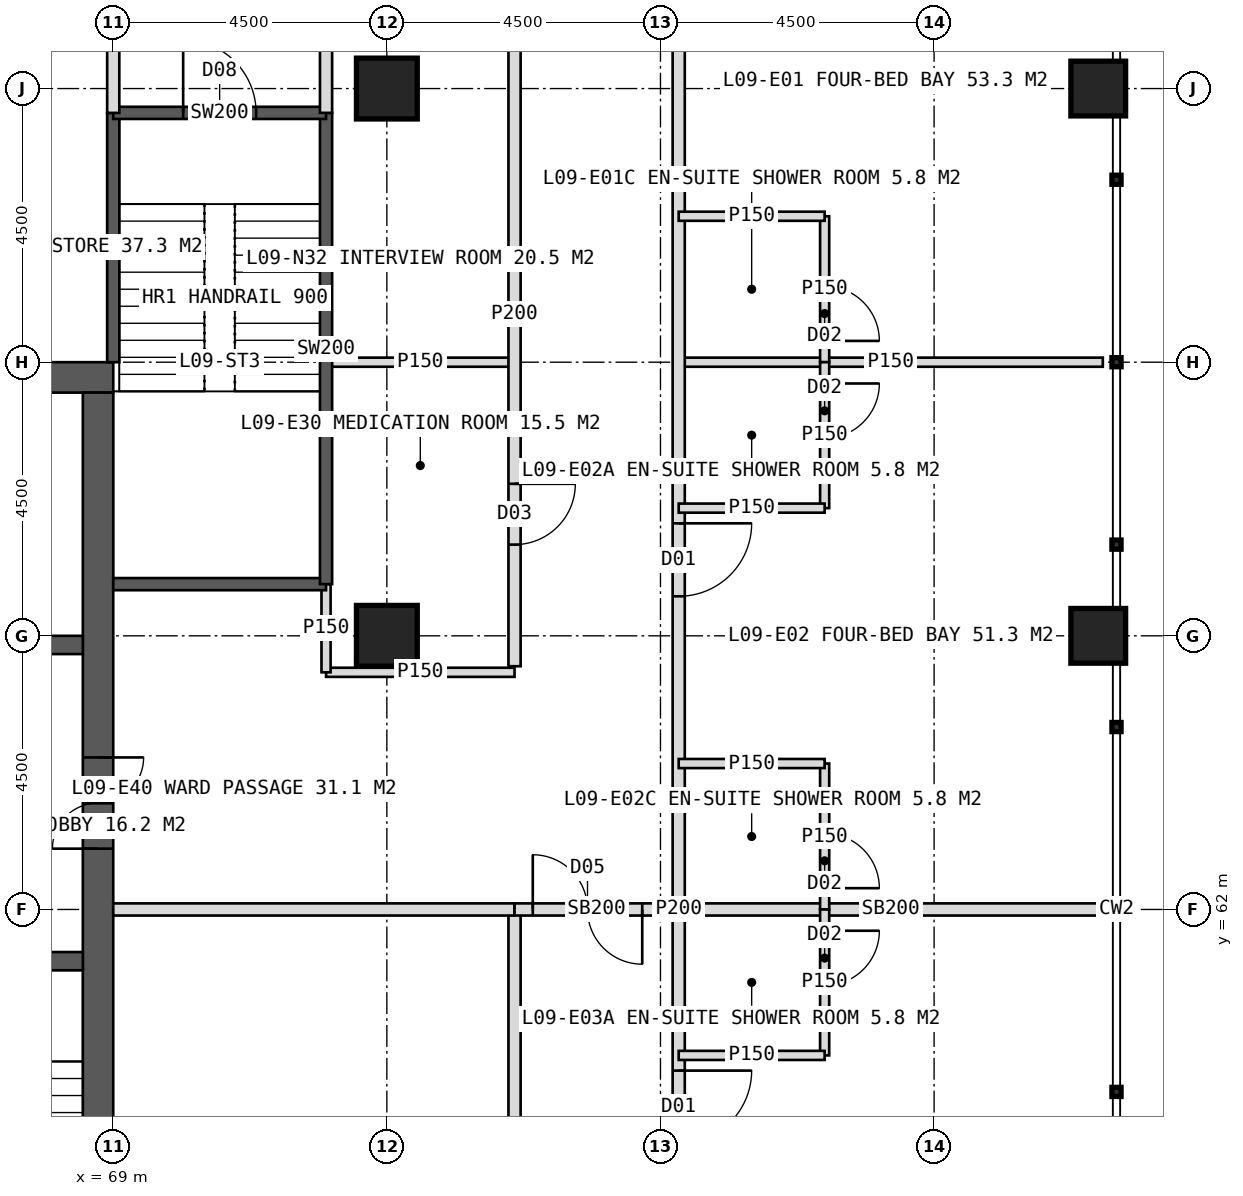
"""IFC4 building model, lengths in metres.
Left out: names, types, materials, properties, quantities, classifications, styles, units other than length and angle.
Written with IfcOpenShell. Run it as: python <this file> out.ifc"""

import sys

from ifc_helpers import new_model, si_unit, direction, frame, frame_2d, origin, origin_2d, place, context, subcontext, project, spatial, rectangle, hollow_rectangle, extrude, element, fill, save


model = new_model("IFC4")
c1 = context("Model", 3, precision=1e-05, world=origin(), true_north=direction((0.0, 1.0)))
c2 = subcontext(c1, "Body", "Model", "MODEL_VIEW")
j1 = project(units=[si_unit("LENGTHUNIT", "METRE"), si_unit("PLANEANGLEUNIT", "RADIAN")], contexts=[c1])
p1 = place(None, origin())
s1 = spatial("IfcSite", under=j1, at=p1, CompositionType="ELEMENT")
p2 = place(p1, origin())
s2 = spatial("IfcBuilding", under=s1, at=p2, CompositionType="ELEMENT")
p3 = place(p2, frame((0.0, 0.0, 43.0)))
s3 = spatial("IfcBuildingStorey", under=s2, at=p3, CompositionType="ELEMENT", Elevation=43.0)
p4 = place(p3, frame((51.0, 70.75, 0.0), z_axis=(0.0, 0.0, 1.0), x_axis=(1.0, 0.0, 0.0)))
e1 = element("IfcWall", 1, at=p4, inside=s3, PredefinedType="SHEAR", context=c2, shape_type="SweptSolid", body=[
    extrude(rectangle(XDim=18.0, YDim=0.5, at=frame_2d((9.0, 0.0))), origin(), (0.0, 0.0, 1.0), 4.0),
])
p5 = place(p4, frame((8.1, 0.0, 0.0)))
e2 = element("IfcOpeningElement", 2, at=p5, cuts=e1, PredefinedType="OPENING", context=c2, shape_type="SweptSolid", body=[
    extrude(rectangle(XDim=1.8, YDim=2.2, at=frame_2d((0.9, 1.1))), frame((0.0, 0.26, 0.0), z_axis=(0.0, -1.0, 0.0), x_axis=(1.0, 0.0, 0.0)), (0.0, 0.0, 1.0), 0.52),
])
p6 = place(p3, frame((68.75, 53.5, 0.0), z_axis=(0.0, 0.0, 1.0), x_axis=(0.0, 1.0, 0.0)))
e3 = element("IfcWall", 3, at=p6, inside=s3, PredefinedType="SHEAR", context=c2, shape_type="SweptSolid", body=[
    extrude(rectangle(XDim=17.0, YDim=0.5, at=frame_2d((8.5, 0.0))), origin(), (0.0, 0.0, 1.0), 4.0),
])
p7 = place(p6, frame((9.5, 0.0, 0.0)))
e4 = element("IfcOpeningElement", 4, at=p7, cuts=e3, PredefinedType="OPENING", context=c2, shape_type="SweptSolid", body=[
    extrude(rectangle(XDim=1.5, YDim=2.2, at=frame_2d((0.75, 1.1))), frame((0.0, 0.26, 0.0), z_axis=(0.0, -1.0, 0.0), x_axis=(1.0, 0.0, 0.0)), (0.0, 0.0, 1.0), 0.52),
])
p8 = place(p3, frame((65.2, 61.15, 0.0), z_axis=(0.0, 0.0, 1.0), x_axis=(1.0, 0.0, 0.0)))
e5 = element("IfcWall", 5, at=p8, inside=s3, PredefinedType="SHEAR", context=c2, shape_type="SweptSolid", body=[
    extrude(rectangle(XDim=3.3, YDim=0.3, at=frame_2d((1.65, 0.0))), origin(), (0.0, 0.0, 1.0), 4.0),
])
p9 = place(p8, frame((1.05, 0.0, 0.0)))
e6 = element("IfcOpeningElement", 6, at=p9, cuts=e5, PredefinedType="OPENING", context=c2, shape_type="SweptSolid", body=[
    extrude(rectangle(XDim=1.2, YDim=2.1, at=frame_2d((0.6, 1.05))), frame((0.0, 0.16, 0.0), z_axis=(0.0, -1.0, 0.0), x_axis=(1.0, 0.0, 0.0)), (0.0, 0.0, 1.0), 0.32),
])
p10 = place(p3, frame((65.2, 66.35, 0.0), z_axis=(0.0, 0.0, 1.0), x_axis=(1.0, 0.0, 0.0)))
e7 = element("IfcWall", 7, at=p10, inside=s3, PredefinedType="SHEAR", context=c2, shape_type="SweptSolid", body=[
    extrude(rectangle(XDim=3.3, YDim=0.3, at=frame_2d((1.65, 0.0))), origin(), (0.0, 0.0, 1.0), 4.0),
])
p11 = place(p10, frame((1.05, 0.0, 0.0)))
e8 = element("IfcOpeningElement", 8, at=p11, cuts=e7, PredefinedType="OPENING", context=c2, shape_type="SweptSolid", body=[
    extrude(rectangle(XDim=1.2, YDim=2.2, at=frame_2d((0.6, 1.1))), frame((0.0, 0.16, 0.0), z_axis=(0.0, -1.0, 0.0), x_axis=(1.0, 0.0, 0.0)), (0.0, 0.0, 1.0), 0.32),
])
for number, where, z_axis, x_axis in (
    (9, (73.5, 75.5, 0.0), (0.0, 0.0, 1.0), (1.0, 0.0, 0.0)),
    (10, (73.5, 66.5, 0.0), (0.0, 0.0, 1.0), (1.0, 0.0, 0.0)),
):
    element("IfcColumn", number, at=place(p3, frame(where, z_axis=z_axis, x_axis=x_axis)), inside=s3, PredefinedType="COLUMN", context=c2, shape_type="SweptSolid", body=[
        extrude(hollow_rectangle(XDim=1.0, YDim=1.0, WallThickness=0.1, at=origin_2d()), origin(), (0.0, 0.0, 1.0), 4.0),
    ])
for number, where, z_axis, x_axis in (
    (11, (85.2, 66.5, 0.0), (0.0, 0.0, 1.0), (1.0, 0.0, 0.0)),
    (12, (85.2, 75.5, 0.0), (0.0, 0.0, 1.0), (1.0, 0.0, 0.0)),
):
    element("IfcColumn", number, at=place(p3, frame(where, z_axis=z_axis, x_axis=x_axis)), inside=s3, PredefinedType="COLUMN", context=c2, shape_type="SweptSolid", body=[
        extrude(hollow_rectangle(XDim=0.9, YDim=0.9, WallThickness=0.08, at=origin_2d()), origin(), (0.0, 0.0, 1.0), 4.0),
    ])
p12 = place(p3, frame((78.3, 71.0, 0.0), z_axis=(0.0, 0.0, 1.0), x_axis=(1.0, 0.0, 0.0)))
e13 = element("IfcWall", 13, at=p12, inside=s3, PredefinedType="PARTITIONING", context=c2, shape_type="SweptSolid", body=[
    extrude(rectangle(XDim=6.975, YDim=0.15, at=frame_2d((3.487, 0.0))), origin(), (0.0, 0.0, 1.0), 3.75),
])
p13 = place(p3, frame((78.3, 62.0, 0.0), z_axis=(0.0, 0.0, 1.0), x_axis=(1.0, 0.0, 0.0)))
e14 = element("IfcWall", 14, at=p13, inside=s3, PredefinedType="SOLIDWALL", context=c2, shape_type="SweptSolid", body=[
    extrude(rectangle(XDim=6.975, YDim=0.2, at=frame_2d((3.487, 0.0))), origin(), (0.0, 0.0, 1.0), 2.75),
])
p14 = place(p3, frame((78.3, 80.3, 0.0), z_axis=(0.0, 0.0, 1.0), x_axis=(0.0, -1.0, 0.0)))
e15 = element("IfcWall", 15, at=p14, inside=s3, PredefinedType="PARTITIONING", context=c2, shape_type="SweptSolid", body=[
    extrude(rectangle(XDim=36.6, YDim=0.2, at=frame_2d((18.3, 0.0))), origin(), (0.0, 0.0, 1.0), 3.75),
])
p15 = place(p14, frame((2.65, 0.0, 0.0)))
e16 = element("IfcOpeningElement", 16, at=p15, cuts=e15, PredefinedType="OPENING", context=c2, shape_type="SweptSolid", body=[
    extrude(rectangle(XDim=1.2, YDim=2.2, at=frame_2d((0.6, 1.1))), frame((0.0, 0.11, 0.0), z_axis=(0.0, -1.0, 0.0), x_axis=(1.0, 0.0, 0.0)), (0.0, 0.0, 1.0), 0.22),
])
p16 = place(p14, frame((11.95, 0.0, 0.0)))
e17 = element("IfcOpeningElement", 17, at=p16, cuts=e15, PredefinedType="OPENING", context=c2, shape_type="SweptSolid", body=[
    extrude(rectangle(XDim=1.2, YDim=2.2, at=frame_2d((0.6, 1.1))), frame((0.0, 0.11, 0.0), z_axis=(0.0, -1.0, 0.0), x_axis=(1.0, 0.0, 0.0)), (0.0, 0.0, 1.0), 0.22),
])
p17 = place(p14, frame((20.95, 0.0, 0.0)))
e18 = element("IfcOpeningElement", 18, at=p17, cuts=e15, PredefinedType="OPENING", context=c2, shape_type="SweptSolid", body=[
    extrude(rectangle(XDim=1.2, YDim=2.2, at=frame_2d((0.6, 1.1))), frame((0.0, 0.11, 0.0), z_axis=(0.0, -1.0, 0.0), x_axis=(1.0, 0.0, 0.0)), (0.0, 0.0, 1.0), 0.22),
])
p18 = place(p14, frame((29.95, 0.0, 0.0)))
e19 = element("IfcOpeningElement", 19, at=p18, cuts=e15, PredefinedType="OPENING", context=c2, shape_type="SweptSolid", body=[
    extrude(rectangle(XDim=1.2, YDim=2.2, at=frame_2d((0.6, 1.1))), frame((0.0, 0.11, 0.0), z_axis=(0.0, -1.0, 0.0), x_axis=(1.0, 0.0, 0.0)), (0.0, 0.0, 1.0), 0.22),
])
p19 = place(p3, frame((80.7, 73.4, 0.0), z_axis=(0.0, 0.0, 1.0), x_axis=(0.0, -1.0, 0.0)))
e20 = element("IfcWall", 20, at=p19, inside=s3, PredefinedType="PARTITIONING", context=c2, shape_type="SweptSolid", body=[
    extrude(rectangle(XDim=2.4, YDim=0.15, at=frame_2d((1.2, 0.0))), origin(), (0.0, 0.0, 1.0), 3.75),
])
p20 = place(p19, frame((1.15, 0.0, 0.0)))
e21 = element("IfcOpeningElement", 21, at=p20, cuts=e20, PredefinedType="OPENING", context=c2, shape_type="SweptSolid", body=[
    extrude(rectangle(XDim=0.9, YDim=2.1, at=frame_2d((0.45, 1.05))), frame((0.0, 0.085, 0.0), z_axis=(0.0, -1.0, 0.0), x_axis=(1.0, 0.0, 0.0)), (0.0, 0.0, 1.0), 0.17),
])
p21 = place(p3, frame((78.3, 73.4, 0.0), z_axis=(0.0, 0.0, 1.0), x_axis=(1.0, 0.0, 0.0)))
e22 = element("IfcWall", 22, at=p21, inside=s3, PredefinedType="PARTITIONING", context=c2, shape_type="SweptSolid", body=[
    extrude(rectangle(XDim=2.4, YDim=0.15, at=frame_2d((1.2, 0.0))), origin(), (0.0, 0.0, 1.0), 3.75),
])
p22 = place(p3, frame((80.7, 71.0, 0.0), z_axis=(0.0, 0.0, 1.0), x_axis=(0.0, -1.0, 0.0)))
e23 = element("IfcWall", 23, at=p22, inside=s3, PredefinedType="PARTITIONING", context=c2, shape_type="SweptSolid", body=[
    extrude(rectangle(XDim=2.4, YDim=0.15, at=frame_2d((1.2, 0.0))), origin(), (0.0, 0.0, 1.0), 3.75),
])
p23 = place(p22, frame((0.35, 0.0, 0.0)))
e24 = element("IfcOpeningElement", 24, at=p23, cuts=e23, PredefinedType="OPENING", context=c2, shape_type="SweptSolid", body=[
    extrude(rectangle(XDim=0.9, YDim=2.1, at=frame_2d((0.45, 1.05))), frame((0.0, 0.085, 0.0), z_axis=(0.0, -1.0, 0.0), x_axis=(1.0, 0.0, 0.0)), (0.0, 0.0, 1.0), 0.17),
])
p24 = place(p3, frame((78.3, 68.6, 0.0), z_axis=(0.0, 0.0, 1.0), x_axis=(1.0, 0.0, 0.0)))
e25 = element("IfcWall", 25, at=p24, inside=s3, PredefinedType="PARTITIONING", context=c2, shape_type="SweptSolid", body=[
    extrude(rectangle(XDim=2.4, YDim=0.15, at=frame_2d((1.2, 0.0))), origin(), (0.0, 0.0, 1.0), 3.75),
])
p25 = place(p3, frame((80.7, 64.4, 0.0), z_axis=(0.0, 0.0, 1.0), x_axis=(0.0, -1.0, 0.0)))
e26 = element("IfcWall", 26, at=p25, inside=s3, PredefinedType="PARTITIONING", context=c2, shape_type="SweptSolid", body=[
    extrude(rectangle(XDim=2.4, YDim=0.15, at=frame_2d((1.2, 0.0))), origin(), (0.0, 0.0, 1.0), 3.75),
])
p26 = place(p25, frame((1.15, 0.0, 0.0)))
e27 = element("IfcOpeningElement", 27, at=p26, cuts=e26, PredefinedType="OPENING", context=c2, shape_type="SweptSolid", body=[
    extrude(rectangle(XDim=0.9, YDim=2.1, at=frame_2d((0.45, 1.05))), frame((0.0, 0.085, 0.0), z_axis=(0.0, -1.0, 0.0), x_axis=(1.0, 0.0, 0.0)), (0.0, 0.0, 1.0), 0.17),
])
p27 = place(p3, frame((78.3, 64.4, 0.0), z_axis=(0.0, 0.0, 1.0), x_axis=(1.0, 0.0, 0.0)))
e28 = element("IfcWall", 28, at=p27, inside=s3, PredefinedType="PARTITIONING", context=c2, shape_type="SweptSolid", body=[
    extrude(rectangle(XDim=2.4, YDim=0.15, at=frame_2d((1.2, 0.0))), origin(), (0.0, 0.0, 1.0), 3.75),
])
p28 = place(p3, frame((80.7, 62.0, 0.0), z_axis=(0.0, 0.0, 1.0), x_axis=(0.0, -1.0, 0.0)))
e29 = element("IfcWall", 29, at=p28, inside=s3, PredefinedType="PARTITIONING", context=c2, shape_type="SweptSolid", body=[
    extrude(rectangle(XDim=2.4, YDim=0.15, at=frame_2d((1.2, 0.0))), origin(), (0.0, 0.0, 1.0), 3.75),
])
p29 = place(p28, frame((0.35, 0.0, 0.0)))
e30 = element("IfcOpeningElement", 30, at=p29, cuts=e29, PredefinedType="OPENING", context=c2, shape_type="SweptSolid", body=[
    extrude(rectangle(XDim=0.9, YDim=2.1, at=frame_2d((0.45, 1.05))), frame((0.0, 0.085, 0.0), z_axis=(0.0, -1.0, 0.0), x_axis=(1.0, 0.0, 0.0)), (0.0, 0.0, 1.0), 0.17),
])
p30 = place(p3, frame((78.3, 59.6, 0.0), z_axis=(0.0, 0.0, 1.0), x_axis=(1.0, 0.0, 0.0)))
e31 = element("IfcWall", 31, at=p30, inside=s3, PredefinedType="PARTITIONING", context=c2, shape_type="SweptSolid", body=[
    extrude(rectangle(XDim=2.4, YDim=0.15, at=frame_2d((1.2, 0.0))), origin(), (0.0, 0.0, 1.0), 3.75),
])
p31 = place(p3, frame((72.5, 71.0, 0.0), z_axis=(0.0, 0.0, 1.0), x_axis=(1.0, 0.0, 0.0)))
e32 = element("IfcWall", 32, at=p31, inside=s3, PredefinedType="PARTITIONING", context=c2, shape_type="SweptSolid", body=[
    extrude(rectangle(XDim=3.1, YDim=0.15, at=frame_2d((1.55, 0.0))), origin(), (0.0, 0.0, 1.0), 3.75),
])
p32 = place(p3, frame((75.6, 77.6, 0.0), z_axis=(0.0, 0.0, 1.0), x_axis=(0.0, -1.0, 0.0)))
e33 = element("IfcWall", 33, at=p32, inside=s3, PredefinedType="PARTITIONING", context=c2, shape_type="SweptSolid", body=[
    extrude(rectangle(XDim=11.6, YDim=0.2, at=frame_2d((5.8, 0.0))), origin(), (0.0, 0.0, 1.0), 3.75),
])
p33 = place(p32, frame((8.6, 0.0, 0.0)))
e34 = element("IfcOpeningElement", 34, at=p33, cuts=e33, PredefinedType="OPENING", context=c2, shape_type="SweptSolid", body=[
    extrude(rectangle(XDim=1.0, YDim=2.1, at=frame_2d((0.5, 1.05))), frame((0.0, 0.11, 0.0), z_axis=(0.0, -1.0, 0.0), x_axis=(1.0, 0.0, 0.0)), (0.0, 0.0, 1.0), 0.22),
])
p34 = place(p3, frame((75.6, 62.0, 0.0), z_axis=(0.0, 0.0, 1.0), x_axis=(0.0, -1.0, 0.0)))
e35 = element("IfcWall", 35, at=p34, inside=s3, PredefinedType="PARTITIONING", context=c2, shape_type="SweptSolid", body=[
    extrude(rectangle(XDim=15.6, YDim=0.2, at=frame_2d((7.8, 0.0))), origin(), (0.0, 0.0, 1.0), 3.75),
])
p35 = place(p34, frame((4.0, 0.0, 0.0)))
e36 = element("IfcOpeningElement", 36, at=p35, cuts=e35, PredefinedType="OPENING", context=c2, shape_type="SweptSolid", body=[
    extrude(rectangle(XDim=1.0, YDim=2.1, at=frame_2d((0.5, 1.05))), frame((0.0, 0.11, 0.0), z_axis=(0.0, -1.0, 0.0), x_axis=(1.0, 0.0, 0.0)), (0.0, 0.0, 1.0), 0.22),
])
p36 = place(p34, frame((11.8, 0.0, 0.0)))
e37 = element("IfcOpeningElement", 37, at=p36, cuts=e35, PredefinedType="OPENING", context=c2, shape_type="SweptSolid", body=[
    extrude(rectangle(XDim=1.0, YDim=2.1, at=frame_2d((0.5, 1.05))), frame((0.0, 0.11, 0.0), z_axis=(0.0, -1.0, 0.0), x_axis=(1.0, 0.0, 0.0)), (0.0, 0.0, 1.0), 0.22),
])
p37 = place(p3, frame((72.5, 65.9, 0.0), z_axis=(0.0, 0.0, 1.0), x_axis=(1.0, 0.0, 0.0)))
e38 = element("IfcWall", 38, at=p37, inside=s3, PredefinedType="PARTITIONING", context=c2, shape_type="SweptSolid", body=[
    extrude(rectangle(XDim=3.1, YDim=0.15, at=frame_2d((1.55, 0.0))), origin(), (0.0, 0.0, 1.0), 3.75),
])
p38 = place(p3, frame((69.0, 62.0, 0.0), z_axis=(0.0, 0.0, 1.0), x_axis=(1.0, 0.0, 0.0)))
e39 = element("IfcWall", 39, at=p38, inside=s3, PredefinedType="SOLIDWALL", context=c2, shape_type="SweptSolid", body=[
    extrude(rectangle(XDim=6.6, YDim=0.2, at=frame_2d((3.3, 0.0))), origin(), (0.0, 0.0, 1.0), 2.75),
])
p39 = place(p3, frame((75.6, 62.0, 0.0), z_axis=(0.0, 0.0, 1.0), x_axis=(1.0, 0.0, 0.0)))
e40 = element("IfcWall", 40, at=p39, inside=s3, PredefinedType="SOLIDWALL", context=c2, shape_type="SweptSolid", body=[
    extrude(rectangle(XDim=2.7, YDim=0.2, at=frame_2d((1.35, 0.0))), origin(), (0.0, 0.0, 1.0), 2.75),
])
p40 = place(p39, frame((0.3, 0.0, 0.0)))
e41 = element("IfcOpeningElement", 41, at=p40, cuts=e40, PredefinedType="OPENING", context=c2, shape_type="SweptSolid", body=[
    extrude(rectangle(XDim=1.8, YDim=2.2, at=frame_2d((0.9, 1.1))), frame((0.0, 0.11, 0.0), z_axis=(0.0, -1.0, 0.0), x_axis=(1.0, 0.0, 0.0)), (0.0, 0.0, 1.0), 0.22),
])
p41 = place(p3, frame((72.5, 65.9, 0.0), z_axis=(0.0, 0.0, 1.0), x_axis=(0.0, 1.0, 0.0)))
e42 = element("IfcWall", 42, at=p41, inside=s3, PredefinedType="PARTITIONING", context=c2, shape_type="SweptSolid", body=[
    extrude(rectangle(XDim=1.45, YDim=0.15, at=frame_2d((0.725, 0.0))), origin(), (0.0, 0.0, 1.0), 3.75),
])
p42 = place(p3, frame((69.0, 71.0, 0.0), z_axis=(0.0, 0.0, 1.0), x_axis=(0.0, 1.0, 0.0)))
e43 = element("IfcWall", 43, at=p42, inside=s3, PredefinedType="SOLIDWALL", context=c2, shape_type="SweptSolid", body=[
    extrude(rectangle(XDim=4.1, YDim=0.2, at=frame_2d((2.05, 0.0))), origin(), (0.0, 0.0, 1.0), 3.75),
])
p43 = place(p3, frame((69.0, 67.35, 0.0), z_axis=(0.0, 0.0, 1.0), x_axis=(1.0, 0.0, 0.0)))
e44 = element("IfcWall", 44, at=p43, inside=s3, PredefinedType="SOLIDWALL", context=c2, shape_type="SweptSolid", body=[
    extrude(rectangle(XDim=3.5, YDim=0.2, at=frame_2d((1.75, 0.0))), origin(), (0.0, 0.0, 1.0), 3.75),
])
p44 = place(p3, frame((72.5, 67.35, 0.0), z_axis=(0.0, 0.0, 1.0), x_axis=(0.0, 1.0, 0.0)))
e45 = element("IfcWall", 45, at=p44, inside=s3, PredefinedType="SOLIDWALL", context=c2, shape_type="SweptSolid", body=[
    extrude(rectangle(XDim=7.75, YDim=0.2, at=frame_2d((3.875, 0.0))), origin(), (0.0, 0.0, 1.0), 3.75),
])
p45 = place(p3, frame((69.0, 75.1, 0.0), z_axis=(0.0, 0.0, 1.0), x_axis=(1.0, 0.0, 0.0)))
e46 = element("IfcWall", 46, at=p45, inside=s3, PredefinedType="SOLIDWALL", context=c2, shape_type="SweptSolid", body=[
    extrude(rectangle(XDim=3.5, YDim=0.2, at=frame_2d((1.75, 0.0))), origin(), (0.0, 0.0, 1.0), 3.75),
])
p46 = place(p45, frame((1.15, 0.0, 0.0)))
e47 = element("IfcOpeningElement", 47, at=p46, cuts=e46, PredefinedType="OPENING", context=c2, shape_type="SweptSolid", body=[
    extrude(rectangle(XDim=1.2, YDim=2.1, at=frame_2d((0.6, 1.05))), frame((0.0, 0.11, 0.0), z_axis=(0.0, -1.0, 0.0), x_axis=(1.0, 0.0, 0.0)), (0.0, 0.0, 1.0), 0.22),
])
for number, where, z_axis, x_axis in (
    (48, (69.0, 75.1, 0.0), (0.0, 0.0, 1.0), (0.0, 1.0, 0.0)),
    (49, (72.5, 75.1, 0.0), (0.0, 0.0, 1.0), (0.0, 1.0, 0.0)),
):
    element("IfcWall", number, at=place(p3, frame(where, z_axis=z_axis, x_axis=x_axis)), inside=s3, PredefinedType="PARTITIONING", context=c2, shape_type="SweptSolid", body=[
        extrude(rectangle(XDim=2.5, YDim=0.2, at=frame_2d((1.25, 0.0))), origin(), (0.0, 0.0, 1.0), 3.75),
    ])
p47 = place(p20, origin())
e50 = element("IfcDoor", 50, at=p47, inside=s3, OperationType="SINGLE_SWING_RIGHT", PredefinedType="DOOR", context=c2, shape_type="SweptSolid", body=[
    extrude(rectangle(XDim=0.9, YDim=2.1, at=frame_2d((0.45, 1.05))), frame((0.0, 0.025, 0.0), z_axis=(0.0, -1.0, 0.0), x_axis=(1.0, 0.0, 0.0)), (0.0, 0.0, 1.0), 0.05),
])
fill(e21, e50)
p48 = place(p16, origin())
e51 = element("IfcDoor", 51, at=p48, inside=s3, OperationType="SINGLE_SWING_LEFT", PredefinedType="DOOR", context=c2, shape_type="SweptSolid", body=[
    extrude(rectangle(XDim=1.2, YDim=2.2, at=frame_2d((0.6, 1.1))), frame((0.0, 0.025, 0.0), z_axis=(0.0, -1.0, 0.0), x_axis=(1.0, 0.0, 0.0)), (0.0, 0.0, 1.0), 0.05),
])
fill(e17, e51)
p49 = place(p23, origin())
e52 = element("IfcDoor", 52, at=p49, inside=s3, OperationType="SINGLE_SWING_LEFT", PredefinedType="DOOR", context=c2, shape_type="SweptSolid", body=[
    extrude(rectangle(XDim=0.9, YDim=2.1, at=frame_2d((0.45, 1.05))), frame((0.0, 0.025, 0.0), z_axis=(0.0, -1.0, 0.0), x_axis=(1.0, 0.0, 0.0)), (0.0, 0.0, 1.0), 0.05),
])
fill(e24, e52)
p50 = place(p26, origin())
e53 = element("IfcDoor", 53, at=p50, inside=s3, OperationType="SINGLE_SWING_RIGHT", PredefinedType="DOOR", context=c2, shape_type="SweptSolid", body=[
    extrude(rectangle(XDim=0.9, YDim=2.1, at=frame_2d((0.45, 1.05))), frame((0.0, 0.025, 0.0), z_axis=(0.0, -1.0, 0.0), x_axis=(1.0, 0.0, 0.0)), (0.0, 0.0, 1.0), 0.05),
])
fill(e27, e53)
p51 = place(p17, origin())
e54 = element("IfcDoor", 54, at=p51, inside=s3, OperationType="SINGLE_SWING_LEFT", PredefinedType="DOOR", context=c2, shape_type="SweptSolid", body=[
    extrude(rectangle(XDim=1.2, YDim=2.2, at=frame_2d((0.6, 1.1))), frame((0.0, 0.025, 0.0), z_axis=(0.0, -1.0, 0.0), x_axis=(1.0, 0.0, 0.0)), (0.0, 0.0, 1.0), 0.05),
])
fill(e18, e54)
p52 = place(p29, origin())
e55 = element("IfcDoor", 55, at=p52, inside=s3, OperationType="SINGLE_SWING_LEFT", PredefinedType="DOOR", context=c2, shape_type="SweptSolid", body=[
    extrude(rectangle(XDim=0.9, YDim=2.1, at=frame_2d((0.45, 1.05))), frame((0.0, 0.025, 0.0), z_axis=(0.0, -1.0, 0.0), x_axis=(1.0, 0.0, 0.0)), (0.0, 0.0, 1.0), 0.05),
])
fill(e30, e55)
p53 = place(p33, origin())
e56 = element("IfcDoor", 56, at=p53, inside=s3, OperationType="SINGLE_SWING_LEFT", PredefinedType="DOOR", context=c2, shape_type="SweptSolid", body=[
    extrude(rectangle(XDim=1.0, YDim=2.1, at=frame_2d((0.5, 1.05))), frame((0.0, 0.025, 0.0), z_axis=(0.0, -1.0, 0.0), x_axis=(1.0, 0.0, 0.0)), (0.0, 0.0, 1.0), 0.05),
])
fill(e34, e56)
p54 = place(p40, origin())
e57 = element("IfcDoor", 57, at=p54, inside=s3, OperationType="DOUBLE_DOOR_DOUBLE_SWING", PredefinedType="DOOR", context=c2, shape_type="SweptSolid", body=[
    extrude(rectangle(XDim=1.8, YDim=2.2, at=frame_2d((0.9, 1.1))), frame((0.0, 0.025, 0.0), z_axis=(0.0, -1.0, 0.0), x_axis=(1.0, 0.0, 0.0)), (0.0, 0.0, 1.0), 0.05),
])
fill(e41, e57)
p55 = place(p7, origin())
e58 = element("IfcDoor", 58, at=p55, inside=s3, OperationType="DOUBLE_DOOR_SINGLE_SWING", PredefinedType="DOOR", context=c2, shape_type="SweptSolid", body=[
    extrude(rectangle(XDim=1.5, YDim=2.2, at=frame_2d((0.75, 1.1))), frame((0.0, 0.025, 0.0), z_axis=(0.0, -1.0, 0.0), x_axis=(1.0, 0.0, 0.0)), (0.0, 0.0, 1.0), 0.05),
])
fill(e4, e58)
p56 = place(p46, origin())
e59 = element("IfcDoor", 59, at=p56, inside=s3, OperationType="SINGLE_SWING_LEFT", PredefinedType="DOOR", context=c2, shape_type="SweptSolid", body=[
    extrude(rectangle(XDim=1.2, YDim=2.1, at=frame_2d((0.6, 1.05))), frame((0.0, 0.025, 0.0), z_axis=(0.0, -1.0, 0.0), x_axis=(1.0, 0.0, 0.0)), (0.0, 0.0, 1.0), 0.05),
])
fill(e47, e59)
save(model, sys.argv[1])
